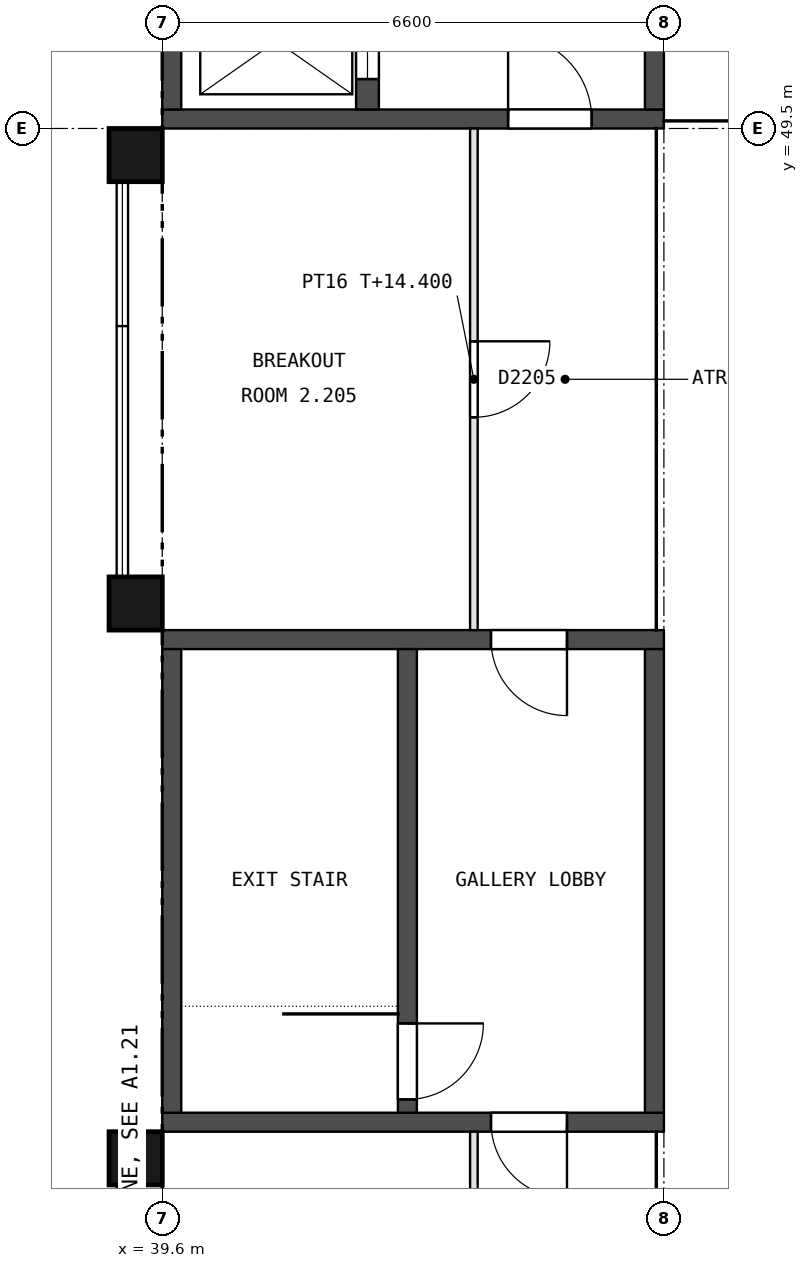
"""IFC4 building model, lengths in metres.
Left out: names, types, materials, properties, quantities, classifications, styles, units other than length and angle.
Written with IfcOpenShell. Run it as: python <this file> out.ifc"""

import sys

from ifc_helpers import new_model, si_unit, direction, frame, frame_2d, origin, origin_2d, place, context, subcontext, project, spatial, rectangle, extrude, element, fill, save


model = new_model("IFC4")
c1 = context("Model", 3, precision=1e-05, world=origin(), true_north=direction((0.0, 1.0)))
c2 = subcontext(c1, "Body", "Model", "MODEL_VIEW")
j1 = project(units=[si_unit("LENGTHUNIT", "METRE"), si_unit("PLANEANGLEUNIT", "RADIAN")], contexts=[c1])
p1 = place(None, origin())
s1 = spatial("IfcSite", under=j1, at=p1, CompositionType="ELEMENT")
p2 = place(p1, origin())
s2 = spatial("IfcBuilding", under=s1, at=p2, CompositionType="ELEMENT")
p3 = place(p2, frame((0.0, 0.0, 9.9)))
s3 = spatial("IfcBuildingStorey", under=s2, at=p3, CompositionType="ELEMENT", Elevation=9.9)
for number, where, z_axis, x_axis in (
    (1, (39.25, 35.95, 0.0), (0.0, 0.0, 1.0), (1.0, 0.0, 0.0)),
    (2, (39.25, 43.25, 0.0), (0.0, 0.0, 1.0), (1.0, 0.0, 0.0)),
    (3, (39.25, 49.15, 0.0), (0.0, 0.0, 1.0), (1.0, 0.0, 0.0)),
):
    element("IfcColumn", number, at=place(p3, frame(where, z_axis=z_axis, x_axis=x_axis)), inside=s3, PredefinedType="COLUMN", context=c2, shape_type="SweptSolid", body=[
        extrude(rectangle(XDim=0.7, YDim=0.7, at=origin_2d()), origin(), (0.0, 0.0, 1.0), 4.5),
    ])
p4 = place(p3, frame((39.6, 49.625, 0.0), z_axis=(0.0, 0.0, 1.0), x_axis=(1.0, 0.0, 0.0)))
e4 = element("IfcWall", 4, at=p4, inside=s3, PredefinedType="SHEAR", context=c2, shape_type="SweptSolid", body=[
    extrude(rectangle(XDim=6.6, YDim=0.25, at=frame_2d((3.3, 0.0))), origin(), (0.0, 0.0, 1.0), 4.25),
])
p5 = place(p4, frame((4.55, 0.0, 0.0)))
e5 = element("IfcOpeningElement", 5, at=p5, cuts=e4, PredefinedType="OPENING", context=c2, shape_type="SweptSolid", body=[
    extrude(rectangle(XDim=1.1, YDim=2.1, at=frame_2d((0.55, 1.05))), frame((0.0, 0.135, 0.0), z_axis=(0.0, -1.0, 0.0), x_axis=(1.0, 0.0, 0.0)), (0.0, 0.0, 1.0), 0.27),
])
for number, where, z_axis, x_axis in (
    (6, (46.075, 49.75, 0.0), (0.0, 0.0, 1.0), (0.0, 1.0, 0.0)),
    (7, (39.725, 49.75, 0.0), (0.0, 0.0, 1.0), (0.0, 1.0, 0.0)),
):
    element("IfcWall", number, at=place(p3, frame(where, z_axis=z_axis, x_axis=x_axis)), inside=s3, PredefinedType="SHEAR", context=c2, shape_type="SweptSolid", body=[
        extrude(rectangle(XDim=6.1, YDim=0.25, at=frame_2d((3.05, 0.0))), origin(), (0.0, 0.0, 1.0), 4.25),
    ])
p6 = place(p3, frame((42.3, 49.75, 0.0), z_axis=(0.0, 0.0, 1.0), x_axis=(0.0, 1.0, 0.0)))
e8 = element("IfcWall", 8, at=p6, inside=s3, PredefinedType="SHEAR", context=c2, shape_type="SweptSolid", body=[
    extrude(rectangle(XDim=3.05, YDim=0.3, at=frame_2d((1.525, 0.0))), origin(), (0.0, 0.0, 1.0), 4.25),
])
p7 = place(p6, frame((0.4, 0.0, 0.0)))
e9 = element("IfcOpeningElement", 9, at=p7, cuts=e8, PredefinedType="OPENING", context=c2, shape_type="SweptSolid", body=[
    extrude(rectangle(XDim=1.0, YDim=2.1, at=frame_2d((0.5, 1.05))), frame((0.0, 0.16, 0.0), z_axis=(0.0, -1.0, 0.0), x_axis=(1.0, 0.0, 0.0)), (0.0, 0.0, 1.0), 0.32),
])
p8 = place(p3, frame((39.6, 36.425, 0.0), z_axis=(0.0, 0.0, 1.0), x_axis=(1.0, 0.0, 0.0)))
e10 = element("IfcWall", 10, at=p8, inside=s3, PredefinedType="SHEAR", context=c2, shape_type="SweptSolid", body=[
    extrude(rectangle(XDim=6.6, YDim=0.25, at=frame_2d((3.3, 0.0))), origin(), (0.0, 0.0, 1.0), 4.25),
])
p9 = place(p8, frame((4.325, 0.0, 0.0)))
e11 = element("IfcOpeningElement", 11, at=p9, cuts=e10, PredefinedType="OPENING", context=c2, shape_type="SweptSolid", body=[
    extrude(rectangle(XDim=1.0, YDim=2.1, at=frame_2d((0.5, 1.05))), frame((0.0, 0.135, 0.0), z_axis=(0.0, -1.0, 0.0), x_axis=(1.0, 0.0, 0.0)), (0.0, 0.0, 1.0), 0.27),
])
p10 = place(p3, frame((39.6, 42.775, 0.0), z_axis=(0.0, 0.0, 1.0), x_axis=(1.0, 0.0, 0.0)))
e12 = element("IfcWall", 12, at=p10, inside=s3, PredefinedType="SHEAR", context=c2, shape_type="SweptSolid", body=[
    extrude(rectangle(XDim=6.6, YDim=0.25, at=frame_2d((3.3, 0.0))), origin(), (0.0, 0.0, 1.0), 4.25),
])
p11 = place(p10, frame((4.325, 0.0, 0.0)))
e13 = element("IfcOpeningElement", 13, at=p11, cuts=e12, PredefinedType="OPENING", context=c2, shape_type="SweptSolid", body=[
    extrude(rectangle(XDim=1.0, YDim=2.1, at=frame_2d((0.5, 1.05))), frame((0.0, 0.135, 0.0), z_axis=(0.0, -1.0, 0.0), x_axis=(1.0, 0.0, 0.0)), (0.0, 0.0, 1.0), 0.27),
])
for number, where, z_axis, x_axis in (
    (14, (39.725, 36.55, 0.0), (0.0, 0.0, 1.0), (0.0, 1.0, 0.0)),
    (15, (46.075, 36.55, 0.0), (0.0, 0.0, 1.0), (0.0, 1.0, 0.0)),
):
    element("IfcWall", number, at=place(p3, frame(where, z_axis=z_axis, x_axis=x_axis)), inside=s3, PredefinedType="SHEAR", context=c2, shape_type="SweptSolid", body=[
        extrude(rectangle(XDim=6.1, YDim=0.25, at=frame_2d((3.05, 0.0))), origin(), (0.0, 0.0, 1.0), 4.25),
    ])
p12 = place(p3, frame((42.825, 36.55, 0.0), z_axis=(0.0, 0.0, 1.0), x_axis=(0.0, 1.0, 0.0)))
e16 = element("IfcWall", 16, at=p12, inside=s3, PredefinedType="SHEAR", context=c2, shape_type="SweptSolid", body=[
    extrude(rectangle(XDim=6.1, YDim=0.25, at=frame_2d((3.05, 0.0))), origin(), (0.0, 0.0, 1.0), 4.25),
])
p13 = place(p12, frame((0.175, 0.0, 0.0)))
e17 = element("IfcOpeningElement", 17, at=p13, cuts=e16, PredefinedType="OPENING", context=c2, shape_type="SweptSolid", body=[
    extrude(rectangle(XDim=1.0, YDim=2.1, at=frame_2d((0.5, 1.05))), frame((0.0, 0.135, 0.0), z_axis=(0.0, -1.0, 0.0), x_axis=(1.0, 0.0, 0.0)), (0.0, 0.0, 1.0), 0.27),
])
for number, where, z_axis, x_axis in (
    (18, (39.6, 36.2, 0.0), (0.0, 0.0, 1.0), (-1.0, 0.0, 0.0)),
    (19, (39.6, 43.0, 0.0), (0.0, 0.0, 1.0), (-1.0, 0.0, 0.0)),
    (20, (39.6, 49.4, 0.0), (0.0, 0.0, 1.0), (-1.0, 0.0, 0.0)),
):
    element("IfcWall", number, at=place(p3, frame(where, z_axis=z_axis, x_axis=x_axis)), inside=s3, PredefinedType="STANDARD", context=c2, shape_type="SweptSolid", body=[
        extrude(rectangle(XDim=0.6, YDim=0.2, at=frame_2d((0.3, 0.0))), origin(), (0.0, 0.0, 1.0), 4.5),
    ])
p14 = place(p3, frame((43.7, 23.25, 0.0), z_axis=(0.0, 0.0, 1.0), x_axis=(0.0, 1.0, 0.0)))
e21 = element("IfcWall", 21, at=p14, inside=s3, PredefinedType="PARTITIONING", context=c2, shape_type="SweptSolid", body=[
    extrude(rectangle(XDim=13.05, YDim=0.1, at=frame_2d((6.525, 0.0))), origin(), (0.0, 0.0, 1.0), 3.5),
])
p15 = place(p14, frame((5.7, 0.0, 0.0)))
e22 = element("IfcOpeningElement", 22, at=p15, cuts=e21, PredefinedType="OPENING", context=c2, shape_type="SweptSolid", body=[
    extrude(rectangle(XDim=1.5, YDim=2.1, at=frame_2d((0.75, 1.05))), frame((0.0, 0.06, 0.0), z_axis=(0.0, -1.0, 0.0), x_axis=(1.0, 0.0, 0.0)), (0.0, 0.0, 1.0), 0.12),
])
p16 = place(p3, frame((43.7, 42.9, 0.0), z_axis=(0.0, 0.0, 1.0), x_axis=(0.0, 1.0, 0.0)))
e23 = element("IfcWall", 23, at=p16, inside=s3, PredefinedType="PARTITIONING", context=c2, shape_type="SweptSolid", body=[
    extrude(rectangle(XDim=6.6, YDim=0.1, at=frame_2d((3.3, 0.0))), origin(), (0.0, 0.0, 1.0), 4.5),
])
p17 = place(p16, frame((2.8, 0.0, 0.0)))
e24 = element("IfcOpeningElement", 24, at=p17, cuts=e23, PredefinedType="OPENING", context=c2, shape_type="SweptSolid", body=[
    extrude(rectangle(XDim=1.0, YDim=2.1, at=frame_2d((0.5, 1.05))), frame((0.0, 0.06, 0.0), z_axis=(0.0, -1.0, 0.0), x_axis=(1.0, 0.0, 0.0)), (0.0, 0.0, 1.0), 0.12),
])
p18 = place(p5, origin())
e25 = element("IfcDoor", 25, at=p18, inside=s3, OperationType="SINGLE_SWING_LEFT", PredefinedType="DOOR", context=c2, shape_type="SweptSolid", body=[
    extrude(rectangle(XDim=1.1, YDim=2.1, at=frame_2d((0.55, 1.05))), frame((0.0, 0.025, 0.0), z_axis=(0.0, -1.0, 0.0), x_axis=(1.0, 0.0, 0.0)), (0.0, 0.0, 1.0), 0.05),
])
fill(e5, e25)
p19 = place(p7, origin())
e26 = element("IfcDoor", 26, at=p19, inside=s3, OperationType="DOUBLE_DOOR_SLIDING", PredefinedType="NOTDEFINED", context=c2, shape_type="SweptSolid", body=[
    extrude(rectangle(XDim=1.0, YDim=2.1, at=frame_2d((0.5, 1.05))), frame((0.0, 0.025, 0.0), z_axis=(0.0, -1.0, 0.0), x_axis=(1.0, 0.0, 0.0)), (0.0, 0.0, 1.0), 0.05),
])
fill(e9, e26)
p20 = place(p9, origin())
e27 = element("IfcDoor", 27, at=p20, inside=s3, OperationType="SINGLE_SWING_RIGHT", PredefinedType="DOOR", context=c2, shape_type="SweptSolid", body=[
    extrude(rectangle(XDim=1.0, YDim=2.1, at=frame_2d((0.5, 1.05))), frame((0.0, 0.025, 0.0), z_axis=(0.0, -1.0, 0.0), x_axis=(1.0, 0.0, 0.0)), (0.0, 0.0, 1.0), 0.05),
])
fill(e11, e27)
p21 = place(p11, origin())
e28 = element("IfcDoor", 28, at=p21, inside=s3, OperationType="SINGLE_SWING_RIGHT", PredefinedType="DOOR", context=c2, shape_type="SweptSolid", body=[
    extrude(rectangle(XDim=1.0, YDim=2.1, at=frame_2d((0.5, 1.05))), frame((0.0, 0.025, 0.0), z_axis=(0.0, -1.0, 0.0), x_axis=(1.0, 0.0, 0.0)), (0.0, 0.0, 1.0), 0.05),
])
fill(e13, e28)
p22 = place(p13, origin())
e29 = element("IfcDoor", 29, at=p22, inside=s3, OperationType="SINGLE_SWING_RIGHT", PredefinedType="DOOR", context=c2, shape_type="SweptSolid", body=[
    extrude(rectangle(XDim=1.0, YDim=2.1, at=frame_2d((0.5, 1.05))), frame((0.0, 0.025, 0.0), z_axis=(0.0, -1.0, 0.0), x_axis=(1.0, 0.0, 0.0)), (0.0, 0.0, 1.0), 0.05),
])
fill(e17, e29)
p23 = place(p17, origin())
e30 = element("IfcDoor", 30, at=p23, inside=s3, OperationType="SINGLE_SWING_RIGHT", PredefinedType="DOOR", context=c2, shape_type="SweptSolid", body=[
    extrude(rectangle(XDim=1.0, YDim=2.1, at=frame_2d((0.5, 1.05))), frame((0.0, 0.025, 0.0), z_axis=(0.0, -1.0, 0.0), x_axis=(1.0, 0.0, 0.0)), (0.0, 0.0, 1.0), 0.05),
])
fill(e24, e30)
save(model, sys.argv[1])
